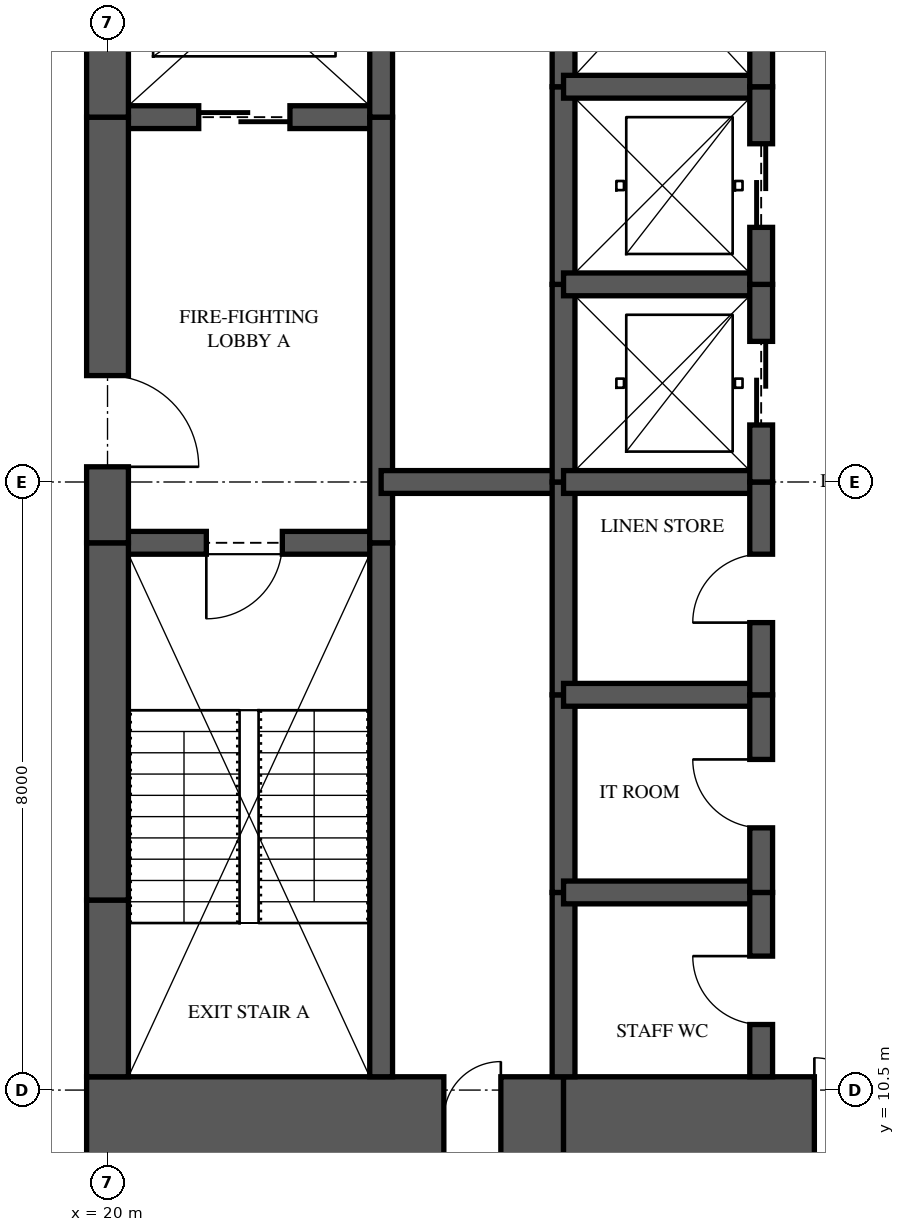
"""IFC4 building model, lengths in metres.
Left out: names, types, materials, properties, quantities, classifications, styles, units other than length and angle.
Written with IfcOpenShell. Run it as: python <this file> out.ifc"""

import sys

from ifc_helpers import new_model, si_unit, direction, frame, frame_2d, origin, place, context, subcontext, project, spatial, rectangle, extrude, element, fill, save


model = new_model("IFC4")
c1 = context("Model", 3, precision=1e-05, world=origin(), true_north=direction((0.0, 1.0)))
c2 = subcontext(c1, "Body", "Model", "MODEL_VIEW")
j1 = project(units=[si_unit("LENGTHUNIT", "METRE"), si_unit("PLANEANGLEUNIT", "RADIAN")], contexts=[c1])
p1 = place(None, origin())
s1 = spatial("IfcSite", under=j1, at=p1, CompositionType="ELEMENT")
p2 = place(p1, origin())
s2 = spatial("IfcBuilding", under=s1, at=p2, CompositionType="ELEMENT")
p3 = place(p2, frame((0.0, 0.0, 259.95)))
s3 = spatial("IfcBuildingStorey", under=s2, at=p3, CompositionType="ELEMENT", Elevation=259.95)
p4 = place(p3, frame((19.725, 10.125, 0.0), z_axis=(0.0, 0.0, 1.0), x_axis=(1.0, 0.0, 0.0)))
e1 = element("IfcWall", 1, at=p4, inside=s3, PredefinedType="SHEAR", context=c2, shape_type="SweptSolid", body=[
    extrude(rectangle(XDim=6.275, YDim=1.1, at=frame_2d((3.137, 0.0))), origin(), (0.0, 0.0, 1.0), 3.9),
])
p5 = place(p4, frame((4.7, 0.0, 0.0)))
e2 = element("IfcOpeningElement", 2, at=p5, cuts=e1, PredefinedType="OPENING", context=c2, shape_type="SweptSolid", body=[
    extrude(rectangle(XDim=0.75, YDim=2.1, at=frame_2d((0.375, 1.05))), frame((0.0, 0.56, 0.0), z_axis=(0.0, -1.0, 0.0), x_axis=(1.0, 0.0, 0.0)), (0.0, 0.0, 1.0), 1.12),
])
p6 = place(p3, frame((26.0, 10.125, 0.0), z_axis=(0.0, 0.0, 1.0), x_axis=(1.0, 0.0, 0.0)))
e3 = element("IfcWall", 3, at=p6, inside=s3, PredefinedType="SHEAR", context=c2, shape_type="SweptSolid", body=[
    extrude(rectangle(XDim=5.6, YDim=1.1, at=frame_2d((2.8, 0.0))), origin(), (0.0, 0.0, 1.0), 3.9),
])
p7 = place(p6, frame((3.3, 0.0, 0.0)))
e4 = element("IfcOpeningElement", 4, at=p7, cuts=e3, PredefinedType="OPENING", context=c2, shape_type="SweptSolid", body=[
    extrude(rectangle(XDim=1.6, YDim=2.1, at=frame_2d((0.8, 1.05))), frame((0.0, 0.56, 0.0), z_axis=(0.0, -1.0, 0.0), x_axis=(1.0, 0.0, 0.0)), (0.0, 0.0, 1.0), 1.12),
])
p8 = place(p3, frame((20.0, 26.325, 0.0), z_axis=(0.0, 0.0, 1.0), x_axis=(0.0, -1.0, 0.0)))
e5 = element("IfcWall", 5, at=p8, inside=s3, PredefinedType="SHEAR", context=c2, shape_type="SweptSolid", body=[
    extrude(rectangle(XDim=3.025, YDim=0.55, at=frame_2d((1.512, 0.0))), origin(), (0.0, 0.0, 1.0), 3.9),
])
p9 = place(p3, frame((20.0, 23.3, 0.0), z_axis=(0.0, 0.0, 1.0), x_axis=(0.0, -1.0, 0.0)))
e6 = element("IfcWall", 6, at=p9, inside=s3, PredefinedType="SHEAR", context=c2, shape_type="SweptSolid", body=[
    extrude(rectangle(XDim=5.6, YDim=0.55, at=frame_2d((2.8, 0.0))), origin(), (0.0, 0.0, 1.0), 3.9),
])
p10 = place(p9, frame((3.4, 0.0, 0.0)))
e7 = element("IfcOpeningElement", 7, at=p10, cuts=e6, PredefinedType="OPENING", context=c2, shape_type="SweptSolid", body=[
    extrude(rectangle(XDim=1.2, YDim=2.2, at=frame_2d((0.6, 1.1))), frame((0.0, 0.285, 0.0), z_axis=(0.0, -1.0, 0.0), x_axis=(1.0, 0.0, 0.0)), (0.0, 0.0, 1.0), 0.57),
])
p11 = place(p3, frame((20.0, 17.7, 0.0), z_axis=(0.0, 0.0, 1.0), x_axis=(0.0, -1.0, 0.0)))
e8 = element("IfcWall", 8, at=p11, inside=s3, PredefinedType="SHEAR", context=c2, shape_type="SweptSolid", body=[
    extrude(rectangle(XDim=4.7, YDim=0.55, at=frame_2d((2.35, 0.0))), origin(), (0.0, 0.0, 1.0), 3.9),
])
p12 = place(p3, frame((20.0, 13.0, 0.0), z_axis=(0.0, 0.0, 1.0), x_axis=(0.0, -1.0, 0.0)))
e9 = element("IfcWall", 9, at=p12, inside=s3, PredefinedType="SHEAR", context=c2, shape_type="SweptSolid", body=[
    extrude(rectangle(XDim=2.325, YDim=0.55, at=frame_2d((1.163, 0.0))), origin(), (0.0, 0.0, 1.0), 3.9),
])
p13 = place(p3, frame((23.6, 10.675, 0.0), z_axis=(0.0, 0.0, 1.0), x_axis=(0.0, 1.0, 0.0)))
e10 = element("IfcWall", 10, at=p13, inside=s3, PredefinedType="SHEAR", context=c2, shape_type="SweptSolid", body=[
    extrude(rectangle(XDim=7.025, YDim=0.3, at=frame_2d((3.512, 0.0))), origin(), (0.0, 0.0, 1.0), 3.9),
])
p14 = place(p3, frame((23.6, 17.7, 0.0), z_axis=(0.0, 0.0, 1.0), x_axis=(0.0, 1.0, 0.0)))
e11 = element("IfcWall", 11, at=p14, inside=s3, PredefinedType="SHEAR", context=c2, shape_type="SweptSolid", body=[
    extrude(rectangle(XDim=5.6, YDim=0.3, at=frame_2d((2.8, 0.0))), origin(), (0.0, 0.0, 1.0), 3.9),
])
p15 = place(p3, frame((23.6, 23.3, 0.0), z_axis=(0.0, 0.0, 1.0), x_axis=(0.0, 1.0, 0.0)))
e12 = element("IfcWall", 12, at=p15, inside=s3, PredefinedType="SHEAR", context=c2, shape_type="SweptSolid", body=[
    extrude(rectangle(XDim=3.025, YDim=0.3, at=frame_2d((1.512, 0.0))), origin(), (0.0, 0.0, 1.0), 3.9),
])
p16 = place(p3, frame((26.0, 10.675, 0.0), z_axis=(0.0, 0.0, 1.0), x_axis=(0.0, 1.0, 0.0)))
e13 = element("IfcWall", 13, at=p16, inside=s3, PredefinedType="SHEAR", context=c2, shape_type="SweptSolid", body=[
    extrude(rectangle(XDim=2.425, YDim=0.3, at=frame_2d((1.212, 0.0))), origin(), (0.0, 0.0, 1.0), 3.9),
])
p17 = place(p3, frame((26.0, 13.1, 0.0), z_axis=(0.0, 0.0, 1.0), x_axis=(0.0, 1.0, 0.0)))
e14 = element("IfcWall", 14, at=p17, inside=s3, PredefinedType="SHEAR", context=c2, shape_type="SweptSolid", body=[
    extrude(rectangle(XDim=2.6, YDim=0.3, at=frame_2d((1.3, 0.0))), origin(), (0.0, 0.0, 1.0), 3.9),
])
p18 = place(p3, frame((26.0, 15.7, 0.0), z_axis=(0.0, 0.0, 1.0), x_axis=(0.0, 1.0, 0.0)))
e15 = element("IfcWall", 15, at=p18, inside=s3, PredefinedType="SHEAR", context=c2, shape_type="SweptSolid", body=[
    extrude(rectangle(XDim=2.8, YDim=0.3, at=frame_2d((1.4, 0.0))), origin(), (0.0, 0.0, 1.0), 3.9),
])
p19 = place(p3, frame((26.0, 18.5, 0.0), z_axis=(0.0, 0.0, 1.0), x_axis=(0.0, 1.0, 0.0)))
e16 = element("IfcWall", 16, at=p19, inside=s3, PredefinedType="SHEAR", context=c2, shape_type="SweptSolid", body=[
    extrude(rectangle(XDim=2.6, YDim=0.3, at=frame_2d((1.3, 0.0))), origin(), (0.0, 0.0, 1.0), 3.9),
])
p20 = place(p3, frame((26.0, 21.1, 0.0), z_axis=(0.0, 0.0, 1.0), x_axis=(0.0, 1.0, 0.0)))
e17 = element("IfcWall", 17, at=p20, inside=s3, PredefinedType="SHEAR", context=c2, shape_type="SweptSolid", body=[
    extrude(rectangle(XDim=2.6, YDim=0.3, at=frame_2d((1.3, 0.0))), origin(), (0.0, 0.0, 1.0), 3.9),
])
p21 = place(p3, frame((26.0, 23.7, 0.0), z_axis=(0.0, 0.0, 1.0), x_axis=(0.0, 1.0, 0.0)))
e18 = element("IfcWall", 18, at=p21, inside=s3, PredefinedType="SHEAR", context=c2, shape_type="SweptSolid", body=[
    extrude(rectangle(XDim=2.625, YDim=0.3, at=frame_2d((1.312, 0.0))), origin(), (0.0, 0.0, 1.0), 3.9),
])
p22 = place(p3, frame((28.6, 10.675, 0.0), z_axis=(0.0, 0.0, 1.0), x_axis=(0.0, 1.0, 0.0)))
e19 = element("IfcWall", 19, at=p22, inside=s3, PredefinedType="SHEAR", context=c2, shape_type="SweptSolid", body=[
    extrude(rectangle(XDim=2.425, YDim=0.3, at=frame_2d((1.212, 0.0))), origin(), (0.0, 0.0, 1.0), 3.9),
])
p23 = place(p22, frame((0.688, 0.0, 0.0)))
e20 = element("IfcOpeningElement", 20, at=p23, cuts=e19, PredefinedType="OPENING", context=c2, shape_type="SweptSolid", body=[
    extrude(rectangle(XDim=0.9, YDim=2.1, at=frame_2d((0.45, 1.05))), frame((0.0, 0.16, 0.0), z_axis=(0.0, -1.0, 0.0), x_axis=(1.0, 0.0, 0.0)), (0.0, 0.0, 1.0), 0.32),
])
p24 = place(p3, frame((28.6, 13.1, 0.0), z_axis=(0.0, 0.0, 1.0), x_axis=(0.0, 1.0, 0.0)))
e21 = element("IfcWall", 21, at=p24, inside=s3, PredefinedType="SHEAR", context=c2, shape_type="SweptSolid", body=[
    extrude(rectangle(XDim=2.6, YDim=0.3, at=frame_2d((1.3, 0.0))), origin(), (0.0, 0.0, 1.0), 3.9),
])
p25 = place(p24, frame((0.85, 0.0, 0.0)))
e22 = element("IfcOpeningElement", 22, at=p25, cuts=e21, PredefinedType="OPENING", context=c2, shape_type="SweptSolid", body=[
    extrude(rectangle(XDim=0.9, YDim=2.1, at=frame_2d((0.45, 1.05))), frame((0.0, 0.16, 0.0), z_axis=(0.0, -1.0, 0.0), x_axis=(1.0, 0.0, 0.0)), (0.0, 0.0, 1.0), 0.32),
])
p26 = place(p3, frame((28.6, 15.7, 0.0), z_axis=(0.0, 0.0, 1.0), x_axis=(0.0, 1.0, 0.0)))
e23 = element("IfcWall", 23, at=p26, inside=s3, PredefinedType="SHEAR", context=c2, shape_type="SweptSolid", body=[
    extrude(rectangle(XDim=2.8, YDim=0.3, at=frame_2d((1.4, 0.0))), origin(), (0.0, 0.0, 1.0), 3.9),
])
p27 = place(p26, frame((0.95, 0.0, 0.0)))
e24 = element("IfcOpeningElement", 24, at=p27, cuts=e23, PredefinedType="OPENING", context=c2, shape_type="SweptSolid", body=[
    extrude(rectangle(XDim=0.9, YDim=2.1, at=frame_2d((0.45, 1.05))), frame((0.0, 0.16, 0.0), z_axis=(0.0, -1.0, 0.0), x_axis=(1.0, 0.0, 0.0)), (0.0, 0.0, 1.0), 0.32),
])
p28 = place(p3, frame((28.6, 18.5, 0.0), z_axis=(0.0, 0.0, 1.0), x_axis=(0.0, 1.0, 0.0)))
e25 = element("IfcWall", 25, at=p28, inside=s3, PredefinedType="SHEAR", context=c2, shape_type="SweptSolid", body=[
    extrude(rectangle(XDim=2.6, YDim=0.3, at=frame_2d((1.3, 0.0))), origin(), (0.0, 0.0, 1.0), 3.9),
])
p29 = place(p28, frame((0.75, 0.0, 0.0)))
e26 = element("IfcOpeningElement", 26, at=p29, cuts=e25, PredefinedType="OPENING", context=c2, shape_type="SweptSolid", body=[
    extrude(rectangle(XDim=1.1, YDim=2.1, at=frame_2d((0.55, 1.05))), frame((0.0, 0.16, 0.0), z_axis=(0.0, -1.0, 0.0), x_axis=(1.0, 0.0, 0.0)), (0.0, 0.0, 1.0), 0.32),
])
p30 = place(p3, frame((28.6, 21.1, 0.0), z_axis=(0.0, 0.0, 1.0), x_axis=(0.0, 1.0, 0.0)))
e27 = element("IfcWall", 27, at=p30, inside=s3, PredefinedType="SHEAR", context=c2, shape_type="SweptSolid", body=[
    extrude(rectangle(XDim=2.6, YDim=0.3, at=frame_2d((1.3, 0.0))), origin(), (0.0, 0.0, 1.0), 3.9),
])
p31 = place(p30, frame((0.75, 0.0, 0.0)))
e28 = element("IfcOpeningElement", 28, at=p31, cuts=e27, PredefinedType="OPENING", context=c2, shape_type="SweptSolid", body=[
    extrude(rectangle(XDim=1.1, YDim=2.1, at=frame_2d((0.55, 1.05))), frame((0.0, 0.16, 0.0), z_axis=(0.0, -1.0, 0.0), x_axis=(1.0, 0.0, 0.0)), (0.0, 0.0, 1.0), 0.32),
])
p32 = place(p3, frame((28.6, 23.7, 0.0), z_axis=(0.0, 0.0, 1.0), x_axis=(0.0, 1.0, 0.0)))
e29 = element("IfcWall", 29, at=p32, inside=s3, PredefinedType="SHEAR", context=c2, shape_type="SweptSolid", body=[
    extrude(rectangle(XDim=2.625, YDim=0.3, at=frame_2d((1.312, 0.0))), origin(), (0.0, 0.0, 1.0), 3.9),
])
p33 = place(p32, frame((0.85, 0.0, 0.0)))
e30 = element("IfcOpeningElement", 30, at=p33, cuts=e29, PredefinedType="OPENING", context=c2, shape_type="SweptSolid", body=[
    extrude(rectangle(XDim=1.1, YDim=2.1, at=frame_2d((0.55, 1.05))), frame((0.0, 0.16, 0.0), z_axis=(0.0, -1.0, 0.0), x_axis=(1.0, 0.0, 0.0)), (0.0, 0.0, 1.0), 0.32),
])
p34 = place(p3, frame((20.0, 17.7, 0.0), z_axis=(0.0, 0.0, 1.0), x_axis=(1.0, 0.0, 0.0)))
e31 = element("IfcWall", 31, at=p34, inside=s3, PredefinedType="SHEAR", context=c2, shape_type="SweptSolid", body=[
    extrude(rectangle(XDim=3.6, YDim=0.3, at=frame_2d((1.8, 0.0))), origin(), (0.0, 0.0, 1.0), 3.9),
])
p35 = place(p34, frame((1.3, 0.0, 0.0)))
e32 = element("IfcOpeningElement", 32, at=p35, cuts=e31, PredefinedType="OPENING", context=c2, shape_type="SweptSolid", body=[
    extrude(rectangle(XDim=1.0, YDim=2.1, at=frame_2d((0.5, 1.05))), frame((0.0, 0.16, 0.0), z_axis=(0.0, -1.0, 0.0), x_axis=(1.0, 0.0, 0.0)), (0.0, 0.0, 1.0), 0.32),
])
p36 = place(p3, frame((20.0, 23.3, 0.0), z_axis=(0.0, 0.0, 1.0), x_axis=(1.0, 0.0, 0.0)))
e33 = element("IfcWall", 33, at=p36, inside=s3, PredefinedType="SHEAR", context=c2, shape_type="SweptSolid", body=[
    extrude(rectangle(XDim=3.6, YDim=0.3, at=frame_2d((1.8, 0.0))), origin(), (0.0, 0.0, 1.0), 3.9),
])
p37 = place(p36, frame((1.2, 0.0, 0.0)))
e34 = element("IfcOpeningElement", 34, at=p37, cuts=e33, PredefinedType="OPENING", context=c2, shape_type="SweptSolid", body=[
    extrude(rectangle(XDim=1.2, YDim=2.1, at=frame_2d((0.6, 1.05))), frame((0.0, 0.16, 0.0), z_axis=(0.0, -1.0, 0.0), x_axis=(1.0, 0.0, 0.0)), (0.0, 0.0, 1.0), 0.32),
])
p38 = place(p3, frame((23.6, 18.5, 0.0), z_axis=(0.0, 0.0, 1.0), x_axis=(1.0, 0.0, 0.0)))
e35 = element("IfcWall", 35, at=p38, inside=s3, PredefinedType="SHEAR", context=c2, shape_type="SweptSolid", body=[
    extrude(rectangle(XDim=2.4, YDim=0.3, at=frame_2d((1.2, 0.0))), origin(), (0.0, 0.0, 1.0), 3.9),
])
for number, where, z_axis, x_axis in (
    (36, (26.0, 13.1, 0.0), (0.0, 0.0, 1.0), (1.0, 0.0, 0.0)),
    (37, (26.0, 15.7, 0.0), (0.0, 0.0, 1.0), (1.0, 0.0, 0.0)),
    (38, (26.0, 18.5, 0.0), (0.0, 0.0, 1.0), (1.0, 0.0, 0.0)),
    (39, (26.0, 21.1, 0.0), (0.0, 0.0, 1.0), (1.0, 0.0, 0.0)),
    (40, (26.0, 23.7, 0.0), (0.0, 0.0, 1.0), (1.0, 0.0, 0.0)),
):
    element("IfcWall", number, at=place(p3, frame(where, z_axis=z_axis, x_axis=x_axis)), inside=s3, PredefinedType="SHEAR", context=c2, shape_type="SweptSolid", body=[
        extrude(rectangle(XDim=2.6, YDim=0.3, at=frame_2d((1.3, 0.0))), origin(), (0.0, 0.0, 1.0), 3.9),
    ])
p39 = place(p35, frame((1.0, 0.0, 0.0), z_axis=(0.0, 0.0, 1.0), x_axis=(-1.0, 0.0, 0.0)))
e41 = element("IfcDoor", 41, at=p39, inside=s3, OperationType="SINGLE_SWING_RIGHT", PredefinedType="DOOR", context=c2, shape_type="SweptSolid", body=[
    extrude(rectangle(XDim=1.0, YDim=2.1, at=frame_2d((0.5, 1.05))), frame((0.0, 0.025, 0.0), z_axis=(0.0, -1.0, 0.0), x_axis=(1.0, 0.0, 0.0)), (0.0, 0.0, 1.0), 0.05),
])
fill(e32, e41)
p40 = place(p10, origin())
e42 = element("IfcDoor", 42, at=p40, inside=s3, OperationType="SINGLE_SWING_RIGHT", PredefinedType="DOOR", context=c2, shape_type="SweptSolid", body=[
    extrude(rectangle(XDim=1.2, YDim=2.2, at=frame_2d((0.6, 1.1))), frame((0.0, 0.025, 0.0), z_axis=(0.0, -1.0, 0.0), x_axis=(1.0, 0.0, 0.0)), (0.0, 0.0, 1.0), 0.05),
])
fill(e7, e42)
p41 = place(p37, origin())
e43 = element("IfcDoor", 43, at=p41, inside=s3, OperationType="SLIDING_TO_LEFT", PredefinedType="DOOR", context=c2, shape_type="SweptSolid", body=[
    extrude(rectangle(XDim=1.2, YDim=2.1, at=frame_2d((0.6, 1.05))), frame((0.0, 0.025, 0.0), z_axis=(0.0, -1.0, 0.0), x_axis=(1.0, 0.0, 0.0)), (0.0, 0.0, 1.0), 0.05),
])
fill(e34, e43)
p42 = place(p29, origin())
e44 = element("IfcDoor", 44, at=p42, inside=s3, OperationType="SLIDING_TO_LEFT", PredefinedType="DOOR", context=c2, shape_type="SweptSolid", body=[
    extrude(rectangle(XDim=1.1, YDim=2.1, at=frame_2d((0.55, 1.05))), frame((0.0, 0.025, 0.0), z_axis=(0.0, -1.0, 0.0), x_axis=(1.0, 0.0, 0.0)), (0.0, 0.0, 1.0), 0.05),
])
fill(e26, e44)
p43 = place(p31, origin())
e45 = element("IfcDoor", 45, at=p43, inside=s3, OperationType="SLIDING_TO_LEFT", PredefinedType="DOOR", context=c2, shape_type="SweptSolid", body=[
    extrude(rectangle(XDim=1.1, YDim=2.1, at=frame_2d((0.55, 1.05))), frame((0.0, 0.025, 0.0), z_axis=(0.0, -1.0, 0.0), x_axis=(1.0, 0.0, 0.0)), (0.0, 0.0, 1.0), 0.05),
])
fill(e28, e45)
p44 = place(p23, origin())
e46 = element("IfcDoor", 46, at=p44, inside=s3, OperationType="SINGLE_SWING_RIGHT", PredefinedType="DOOR", context=c2, shape_type="SweptSolid", body=[
    extrude(rectangle(XDim=0.9, YDim=2.1, at=frame_2d((0.45, 1.05))), frame((0.0, 0.025, 0.0), z_axis=(0.0, -1.0, 0.0), x_axis=(1.0, 0.0, 0.0)), (0.0, 0.0, 1.0), 0.05),
])
fill(e20, e46)
p45 = place(p25, origin())
e47 = element("IfcDoor", 47, at=p45, inside=s3, OperationType="SINGLE_SWING_RIGHT", PredefinedType="DOOR", context=c2, shape_type="SweptSolid", body=[
    extrude(rectangle(XDim=0.9, YDim=2.1, at=frame_2d((0.45, 1.05))), frame((0.0, 0.025, 0.0), z_axis=(0.0, -1.0, 0.0), x_axis=(1.0, 0.0, 0.0)), (0.0, 0.0, 1.0), 0.05),
])
fill(e22, e47)
p46 = place(p27, origin())
e48 = element("IfcDoor", 48, at=p46, inside=s3, OperationType="SINGLE_SWING_LEFT", PredefinedType="DOOR", context=c2, shape_type="SweptSolid", body=[
    extrude(rectangle(XDim=0.9, YDim=2.1, at=frame_2d((0.45, 1.05))), frame((0.0, 0.025, 0.0), z_axis=(0.0, -1.0, 0.0), x_axis=(1.0, 0.0, 0.0)), (0.0, 0.0, 1.0), 0.05),
])
fill(e24, e48)
p47 = place(p7, origin())
e49 = element("IfcDoor", 49, at=p47, inside=s3, OperationType="DOUBLE_DOOR_SINGLE_SWING", PredefinedType="DOOR", context=c2, shape_type="SweptSolid", body=[
    extrude(rectangle(XDim=1.6, YDim=2.1, at=frame_2d((0.8, 1.05))), frame((0.0, 0.025, 0.0), z_axis=(0.0, -1.0, 0.0), x_axis=(1.0, 0.0, 0.0)), (0.0, 0.0, 1.0), 0.05),
])
fill(e4, e49)
p48 = place(p5, origin())
e50 = element("IfcDoor", 50, at=p48, inside=s3, OperationType="SINGLE_SWING_RIGHT", PredefinedType="DOOR", context=c2, shape_type="SweptSolid", body=[
    extrude(rectangle(XDim=0.75, YDim=2.1, at=frame_2d((0.375, 1.05))), frame((0.0, 0.025, 0.0), z_axis=(0.0, -1.0, 0.0), x_axis=(1.0, 0.0, 0.0)), (0.0, 0.0, 1.0), 0.05),
])
fill(e2, e50)
save(model, sys.argv[1])
